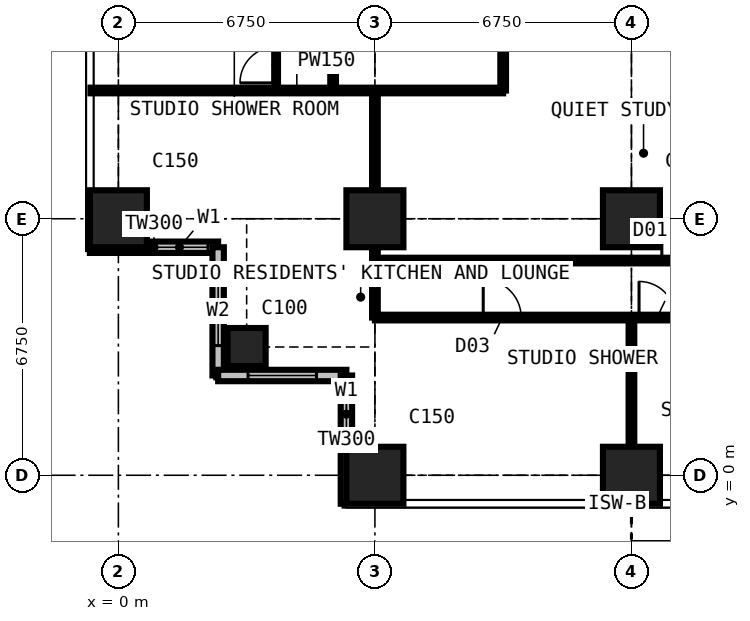
"""IFC4 building model, lengths in metres.
Left out: names, types, materials, properties, quantities, classifications, styles, units other than length and angle.
Written with IfcOpenShell. Run it as: python <this file> out.ifc"""

import sys

from ifc_helpers import new_model, si_unit, direction, frame, frame_2d, origin, origin_2d, place, context, subcontext, project, spatial, rectangle, extrude, element, fill, save


model = new_model("IFC4")
c1 = context("Model", 3, precision=1e-05, world=origin(), true_north=direction((0.0, 1.0)))
c2 = subcontext(c1, "Body", "Model", "MODEL_VIEW")
j1 = project(units=[si_unit("LENGTHUNIT", "METRE"), si_unit("PLANEANGLEUNIT", "RADIAN")], contexts=[c1])
p1 = place(None, origin())
s1 = spatial("IfcSite", under=j1, at=p1, CompositionType="ELEMENT")
p2 = place(p1, origin())
s2 = spatial("IfcBuilding", under=s1, at=p2, CompositionType="ELEMENT")
p3 = place(p2, frame((0.0, 0.0, 126.9)))
s3 = spatial("IfcBuildingStorey", under=s2, at=p3, CompositionType="ELEMENT", Elevation=126.9)
p4 = place(p3, frame((0.0, 6.75, 0.0), z_axis=(0.0, 0.0, 1.0), x_axis=(1.0, 0.0, 0.0)))
e1 = element("IfcColumn", 1, at=p4, inside=s3, PredefinedType="COLUMN", context=c2, shape_type="SweptSolid", body=[
    extrude(rectangle(XDim=1.5, YDim=1.5, at=origin_2d()), origin(), (0.0, 0.0, 1.0), 3.6),
])
p5 = place(p3, frame((3.375, 3.375, 0.0), z_axis=(0.0, 0.0, 1.0), x_axis=(1.0, 0.0, 0.0)))
e2 = element("IfcColumn", 2, at=p5, inside=s3, PredefinedType="COLUMN", context=c2, shape_type="SweptSolid", body=[
    extrude(rectangle(XDim=1.0, YDim=1.0, at=origin_2d()), origin(), (0.0, 0.0, 1.0), 3.6),
])
for number, where, z_axis, x_axis in (
    (3, (6.75, 0.0, 0.0), (0.0, 0.0, 1.0), (1.0, 0.0, 0.0)),
    (4, (6.75, 6.75, 0.0), (0.0, 0.0, 1.0), (1.0, 0.0, 0.0)),
    (5, (13.5, 0.0, 0.0), (0.0, 0.0, 1.0), (1.0, 0.0, 0.0)),
    (6, (13.5, 6.75, 0.0), (0.0, 0.0, 1.0), (1.0, 0.0, 0.0)),
):
    element("IfcColumn", number, at=place(p3, frame(where, z_axis=z_axis, x_axis=x_axis)), inside=s3, PredefinedType="COLUMN", context=c2, shape_type="SweptSolid", body=[
        extrude(rectangle(XDim=1.5, YDim=1.5, at=origin_2d()), origin(), (0.0, 0.0, 1.0), 3.6),
    ])
p6 = place(p3, frame((-0.75, 6.0, 0.0), z_axis=(0.0, 0.0, 1.0), x_axis=(1.0, 0.0, 0.0)))
e7 = element("IfcWall", 7, at=p6, inside=s3, PredefinedType="SOLIDWALL", context=c2, shape_type="SweptSolid", body=[
    extrude(rectangle(XDim=3.375, YDim=0.3, at=frame_2d((1.688, 0.0))), origin(), (0.0, 0.0, 1.0), 3.375),
])
p7 = place(p6, frame((1.607, 0.0, 0.9)))
e8 = element("IfcOpeningElement", 8, at=p7, cuts=e7, PredefinedType="OPENING", context=c2, shape_type="SweptSolid", body=[
    extrude(rectangle(XDim=1.5, YDim=1.8, at=frame_2d((0.75, 0.9))), frame((0.0, 0.16, 0.0), z_axis=(0.0, -1.0, 0.0), x_axis=(1.0, 0.0, 0.0)), (0.0, 0.0, 1.0), 0.32),
])
p8 = place(p3, frame((2.625, 6.0, 0.0), z_axis=(0.0, 0.0, 1.0), x_axis=(0.0, -1.0, 0.0)))
e9 = element("IfcWall", 9, at=p8, inside=s3, PredefinedType="SOLIDWALL", context=c2, shape_type="SweptSolid", body=[
    extrude(rectangle(XDim=3.375, YDim=0.3, at=frame_2d((1.688, 0.0))), origin(), (0.0, 0.0, 1.0), 3.375),
])
p9 = place(p8, frame((0.788, 0.0, 0.6)))
e10 = element("IfcOpeningElement", 10, at=p9, cuts=e9, PredefinedType="OPENING", context=c2, shape_type="SweptSolid", body=[
    extrude(rectangle(XDim=1.8, YDim=2.1, at=frame_2d((0.9, 1.05))), frame((0.0, 0.16, 0.0), z_axis=(0.0, -1.0, 0.0), x_axis=(1.0, 0.0, 0.0)), (0.0, 0.0, 1.0), 0.32),
])
p10 = place(p3, frame((2.625, 2.625, 0.0), z_axis=(0.0, 0.0, 1.0), x_axis=(1.0, 0.0, 0.0)))
e11 = element("IfcWall", 11, at=p10, inside=s3, PredefinedType="SOLIDWALL", context=c2, shape_type="SweptSolid", body=[
    extrude(rectangle(XDim=3.375, YDim=0.3, at=frame_2d((1.688, 0.0))), origin(), (0.0, 0.0, 1.0), 3.375),
])
p11 = place(p10, frame((0.788, 0.0, 0.6)))
e12 = element("IfcOpeningElement", 12, at=p11, cuts=e11, PredefinedType="OPENING", context=c2, shape_type="SweptSolid", body=[
    extrude(rectangle(XDim=1.8, YDim=2.1, at=frame_2d((0.9, 1.05))), frame((0.0, 0.16, 0.0), z_axis=(0.0, -1.0, 0.0), x_axis=(1.0, 0.0, 0.0)), (0.0, 0.0, 1.0), 0.32),
])
p12 = place(p3, frame((6.0, 2.625, 0.0), z_axis=(0.0, 0.0, 1.0), x_axis=(0.0, -1.0, 0.0)))
e13 = element("IfcWall", 13, at=p12, inside=s3, PredefinedType="SOLIDWALL", context=c2, shape_type="SweptSolid", body=[
    extrude(rectangle(XDim=3.375, YDim=0.3, at=frame_2d((1.688, 0.0))), origin(), (0.0, 0.0, 1.0), 3.375),
])
p13 = place(p12, frame((0.268, 0.0, 0.9)))
e14 = element("IfcOpeningElement", 14, at=p13, cuts=e13, PredefinedType="OPENING", context=c2, shape_type="SweptSolid", body=[
    extrude(rectangle(XDim=1.5, YDim=1.8, at=frame_2d((0.75, 0.9))), frame((0.0, 0.16, 0.0), z_axis=(0.0, -1.0, 0.0), x_axis=(1.0, 0.0, 0.0)), (0.0, 0.0, 1.0), 0.32),
])
p14 = place(p3, frame((-0.734, 10.125, 0.0), z_axis=(0.0, 0.0, 1.0), x_axis=(1.0, 0.0, 0.0)))
e15 = element("IfcWall", 15, at=p14, inside=s3, PredefinedType="PARTITIONING", context=c2, shape_type="SweptSolid", body=[
    extrude(rectangle(XDim=10.859, YDim=0.15, at=frame_2d((5.429, 0.0))), origin(), (0.0, 0.0, 1.0), 3.375),
])
p15 = place(p3, frame((4.15, 10.125, 0.0), z_axis=(0.0, 0.0, 1.0), x_axis=(0.0, 1.0, 0.0)))
e16 = element("IfcWall", 16, at=p15, inside=s3, PredefinedType="PARTITIONING", context=c2, shape_type="SweptSolid", body=[
    extrude(rectangle(XDim=16.875, YDim=0.1, at=frame_2d((8.438, 0.0))), origin(), (0.0, 0.0, 1.0), 3.375),
])
p16 = place(p15, frame((13.7, 0.0, 0.0)))
e17 = element("IfcOpeningElement", 17, at=p16, cuts=e16, PredefinedType="OPENING", context=c2, shape_type="SweptSolid", body=[
    extrude(rectangle(XDim=0.95, YDim=2.2, at=frame_2d((0.475, 1.1))), frame((0.0, 0.06, 0.0), z_axis=(0.0, -1.0, 0.0), x_axis=(1.0, 0.0, 0.0)), (0.0, 0.0, 1.0), 0.12),
])
p17 = place(p15, frame((0.2, 0.0, 0.0)))
e18 = element("IfcOpeningElement", 18, at=p17, cuts=e16, PredefinedType="OPENING", context=c2, shape_type="SweptSolid", body=[
    extrude(rectangle(XDim=0.95, YDim=2.2, at=frame_2d((0.475, 1.1))), frame((0.0, 0.06, 0.0), z_axis=(0.0, -1.0, 0.0), x_axis=(1.0, 0.0, 0.0)), (0.0, 0.0, 1.0), 0.12),
])
p18 = place(p15, frame((3.625, 0.0, 0.0)))
e19 = element("IfcOpeningElement", 19, at=p18, cuts=e16, PredefinedType="OPENING", context=c2, shape_type="SweptSolid", body=[
    extrude(rectangle(XDim=0.95, YDim=2.2, at=frame_2d((0.475, 1.1))), frame((0.0, 0.06, 0.0), z_axis=(0.0, -1.0, 0.0), x_axis=(1.0, 0.0, 0.0)), (0.0, 0.0, 1.0), 0.12),
])
p19 = place(p15, frame((7.0, 0.0, 0.0)))
e20 = element("IfcOpeningElement", 20, at=p19, cuts=e16, PredefinedType="OPENING", context=c2, shape_type="SweptSolid", body=[
    extrude(rectangle(XDim=0.95, YDim=2.2, at=frame_2d((0.475, 1.1))), frame((0.0, 0.06, 0.0), z_axis=(0.0, -1.0, 0.0), x_axis=(1.0, 0.0, 0.0)), (0.0, 0.0, 1.0), 0.12),
])
p20 = place(p15, frame((10.375, 0.0, 0.0)))
e21 = element("IfcOpeningElement", 21, at=p20, cuts=e16, PredefinedType="OPENING", context=c2, shape_type="SweptSolid", body=[
    extrude(rectangle(XDim=0.95, YDim=2.2, at=frame_2d((0.475, 1.1))), frame((0.0, 0.06, 0.0), z_axis=(0.0, -1.0, 0.0), x_axis=(1.0, 0.0, 0.0)), (0.0, 0.0, 1.0), 0.12),
])
p21 = place(p3, frame((5.65, 10.125, 0.0), z_axis=(0.0, 0.0, 1.0), x_axis=(0.0, 1.0, 0.0)))
e22 = element("IfcWall", 22, at=p21, inside=s3, PredefinedType="PARTITIONING", context=c2, shape_type="SweptSolid", body=[
    extrude(rectangle(XDim=10.762, YDim=0.15, at=frame_2d((5.381, 0.0))), origin(), (0.0, 0.0, 1.0), 3.375),
])
p22 = place(p21, frame((4.9, 0.0, 0.0)))
e23 = element("IfcOpeningElement", 23, at=p22, cuts=e22, PredefinedType="OPENING", context=c2, shape_type="SweptSolid", body=[
    extrude(rectangle(XDim=0.95, YDim=2.2, at=frame_2d((0.475, 1.1))), frame((0.0, 0.085, 0.0), z_axis=(0.0, -1.0, 0.0), x_axis=(1.0, 0.0, 0.0)), (0.0, 0.0, 1.0), 0.17),
])
p23 = place(p3, frame((6.75, 4.15, 0.0), z_axis=(0.0, 0.0, 1.0), x_axis=(0.0, 1.0, 0.0)))
e24 = element("IfcWall", 24, at=p23, inside=s3, PredefinedType="PARTITIONING", context=c2, shape_type="SweptSolid", body=[
    extrude(rectangle(XDim=5.975, YDim=0.15, at=frame_2d((2.988, 0.0))), origin(), (0.0, 0.0, 1.0), 2.877),
])
p24 = place(p3, frame((6.75, 4.15, 0.0), z_axis=(0.0, 0.0, 1.0), x_axis=(1.0, 0.0, 0.0)))
e25 = element("IfcWall", 25, at=p24, inside=s3, PredefinedType="PARTITIONING", context=c2, shape_type="SweptSolid", body=[
    extrude(rectangle(XDim=23.625, YDim=0.15, at=frame_2d((11.812, 0.0))), origin(), (0.0, 0.0, 1.0), 3.375),
])
p25 = place(p24, frame((2.85, 0.0, 0.0)))
e26 = element("IfcOpeningElement", 26, at=p25, cuts=e25, PredefinedType="OPENING", context=c2, shape_type="SweptSolid", body=[
    extrude(rectangle(XDim=1.0, YDim=2.2, at=frame_2d((0.5, 1.1))), frame((0.0, 0.085, 0.0), z_axis=(0.0, -1.0, 0.0), x_axis=(1.0, 0.0, 0.0)), (0.0, 0.0, 1.0), 0.17),
])
p26 = place(p24, frame((18.475, 0.0, 0.0)))
e27 = element("IfcOpeningElement", 27, at=p26, cuts=e25, PredefinedType="OPENING", context=c2, shape_type="SweptSolid", body=[
    extrude(rectangle(XDim=0.95, YDim=2.2, at=frame_2d((0.475, 1.1))), frame((0.0, 0.085, 0.0), z_axis=(0.0, -1.0, 0.0), x_axis=(1.0, 0.0, 0.0)), (0.0, 0.0, 1.0), 0.17),
])
p27 = place(p24, frame((11.725, 0.0, 0.0)))
e28 = element("IfcOpeningElement", 28, at=p27, cuts=e25, PredefinedType="OPENING", context=c2, shape_type="SweptSolid", body=[
    extrude(rectangle(XDim=0.95, YDim=2.2, at=frame_2d((0.475, 1.1))), frame((0.0, 0.085, 0.0), z_axis=(0.0, -1.0, 0.0), x_axis=(1.0, 0.0, 0.0)), (0.0, 0.0, 1.0), 0.17),
])
p28 = place(p24, frame((6.95, 0.0, 0.0)))
e29 = element("IfcOpeningElement", 29, at=p28, cuts=e25, PredefinedType="OPENING", context=c2, shape_type="SweptSolid", body=[
    extrude(rectangle(XDim=0.95, YDim=2.2, at=frame_2d((0.475, 1.1))), frame((0.0, 0.085, 0.0), z_axis=(0.0, -1.0, 0.0), x_axis=(1.0, 0.0, 0.0)), (0.0, 0.0, 1.0), 0.17),
])
p29 = place(p3, frame((6.75, 5.65, 0.0), z_axis=(0.0, 0.0, 1.0), x_axis=(1.0, 0.0, 0.0)))
e30 = element("IfcWall", 30, at=p29, inside=s3, PredefinedType="PARTITIONING", context=c2, shape_type="SweptSolid", body=[
    extrude(rectangle(XDim=14.137, YDim=0.15, at=frame_2d((7.069, 0.0))), origin(), (0.0, 0.0, 1.0), 3.375),
])
p30 = place(p29, frame((7.55, 0.0, 0.0)))
e31 = element("IfcOpeningElement", 31, at=p30, cuts=e30, PredefinedType="OPENING", context=c2, shape_type="SweptSolid", body=[
    extrude(rectangle(XDim=0.95, YDim=2.2, at=frame_2d((0.475, 1.1))), frame((0.0, 0.085, 0.0), z_axis=(0.0, -1.0, 0.0), x_axis=(1.0, 0.0, 0.0)), (0.0, 0.0, 1.0), 0.17),
])
p31 = place(p3, frame((10.125, 10.125, 0.0), z_axis=(0.0, 0.0, 1.0), x_axis=(0.0, 1.0, 0.0)))
e32 = element("IfcWall", 32, at=p31, inside=s3, PredefinedType="PARTITIONING", context=c2, shape_type="SweptSolid", body=[
    extrude(rectangle(XDim=1.175, YDim=0.15, at=frame_2d((0.587, 0.0))), origin(), (0.0, 0.0, 1.0), 3.375),
])
p32 = place(p3, frame((13.5, -0.734, 0.0), z_axis=(0.0, 0.0, 1.0), x_axis=(0.0, 1.0, 0.0)))
e33 = element("IfcWall", 33, at=p32, inside=s3, PredefinedType="PARTITIONING", context=c2, shape_type="SweptSolid", body=[
    extrude(rectangle(XDim=4.884, YDim=0.15, at=frame_2d((2.442, 0.0))), origin(), (0.0, 0.0, 1.0), 2.61),
])
p33 = place(p7, origin())
e34 = element("IfcWindow", 34, at=p33, inside=s3, PartitioningType="SINGLE_PANEL", PredefinedType="WINDOW", context=c2, shape_type="SweptSolid", body=[
    extrude(rectangle(XDim=1.5, YDim=1.8, at=frame_2d((0.75, 0.9))), frame((0.0, 0.03, 0.0), z_axis=(0.0, -1.0, 0.0), x_axis=(1.0, 0.0, 0.0)), (0.0, 0.0, 1.0), 0.06),
])
fill(e8, e34)
p34 = place(p9, origin())
e35 = element("IfcWindow", 35, at=p34, inside=s3, PartitioningType="SINGLE_PANEL", PredefinedType="WINDOW", context=c2, shape_type="SweptSolid", body=[
    extrude(rectangle(XDim=1.8, YDim=2.1, at=frame_2d((0.9, 1.05))), frame((0.0, 0.03, 0.0), z_axis=(0.0, -1.0, 0.0), x_axis=(1.0, 0.0, 0.0)), (0.0, 0.0, 1.0), 0.06),
])
fill(e10, e35)
p35 = place(p11, origin())
e36 = element("IfcWindow", 36, at=p35, inside=s3, PartitioningType="SINGLE_PANEL", PredefinedType="WINDOW", context=c2, shape_type="SweptSolid", body=[
    extrude(rectangle(XDim=1.8, YDim=2.1, at=frame_2d((0.9, 1.05))), frame((0.0, 0.03, 0.0), z_axis=(0.0, -1.0, 0.0), x_axis=(1.0, 0.0, 0.0)), (0.0, 0.0, 1.0), 0.06),
])
fill(e12, e36)
p36 = place(p13, origin())
e37 = element("IfcWindow", 37, at=p36, inside=s3, PartitioningType="SINGLE_PANEL", PredefinedType="WINDOW", context=c2, shape_type="SweptSolid", body=[
    extrude(rectangle(XDim=1.5, YDim=1.8, at=frame_2d((0.75, 0.9))), frame((0.0, 0.03, 0.0), z_axis=(0.0, -1.0, 0.0), x_axis=(1.0, 0.0, 0.0)), (0.0, 0.0, 1.0), 0.06),
])
fill(e14, e37)
p37 = place(p25, origin())
e38 = element("IfcDoor", 38, at=p37, inside=s3, OperationType="SINGLE_SWING_LEFT", PredefinedType="DOOR", context=c2, shape_type="SweptSolid", body=[
    extrude(rectangle(XDim=1.0, YDim=2.2, at=frame_2d((0.5, 1.1))), frame((0.0, 0.025, 0.0), z_axis=(0.0, -1.0, 0.0), x_axis=(1.0, 0.0, 0.0)), (0.0, 0.0, 1.0), 0.05),
])
fill(e26, e38)
p38 = place(p28, origin())
e39 = element("IfcDoor", 39, at=p38, inside=s3, OperationType="SINGLE_SWING_LEFT", PredefinedType="DOOR", context=c2, shape_type="SweptSolid", body=[
    extrude(rectangle(XDim=0.95, YDim=2.2, at=frame_2d((0.475, 1.1))), frame((0.0, 0.025, 0.0), z_axis=(0.0, -1.0, 0.0), x_axis=(1.0, 0.0, 0.0)), (0.0, 0.0, 1.0), 0.05),
])
fill(e29, e39)
p39 = place(p30, origin())
e40 = element("IfcDoor", 40, at=p39, inside=s3, OperationType="SINGLE_SWING_LEFT", PredefinedType="DOOR", context=c2, shape_type="SweptSolid", body=[
    extrude(rectangle(XDim=0.95, YDim=2.2, at=frame_2d((0.475, 1.1))), frame((0.0, 0.025, 0.0), z_axis=(0.0, -1.0, 0.0), x_axis=(1.0, 0.0, 0.0)), (0.0, 0.0, 1.0), 0.05),
])
fill(e31, e40)
p40 = place(p17, origin())
e41 = element("IfcDoor", 41, at=p40, inside=s3, OperationType="SINGLE_SWING_LEFT", PredefinedType="DOOR", context=c2, shape_type="SweptSolid", body=[
    extrude(rectangle(XDim=0.95, YDim=2.2, at=frame_2d((0.475, 1.1))), frame((0.0, 0.025, 0.0), z_axis=(0.0, -1.0, 0.0), x_axis=(1.0, 0.0, 0.0)), (0.0, 0.0, 1.0), 0.05),
])
fill(e18, e41)
save(model, sys.argv[1])
